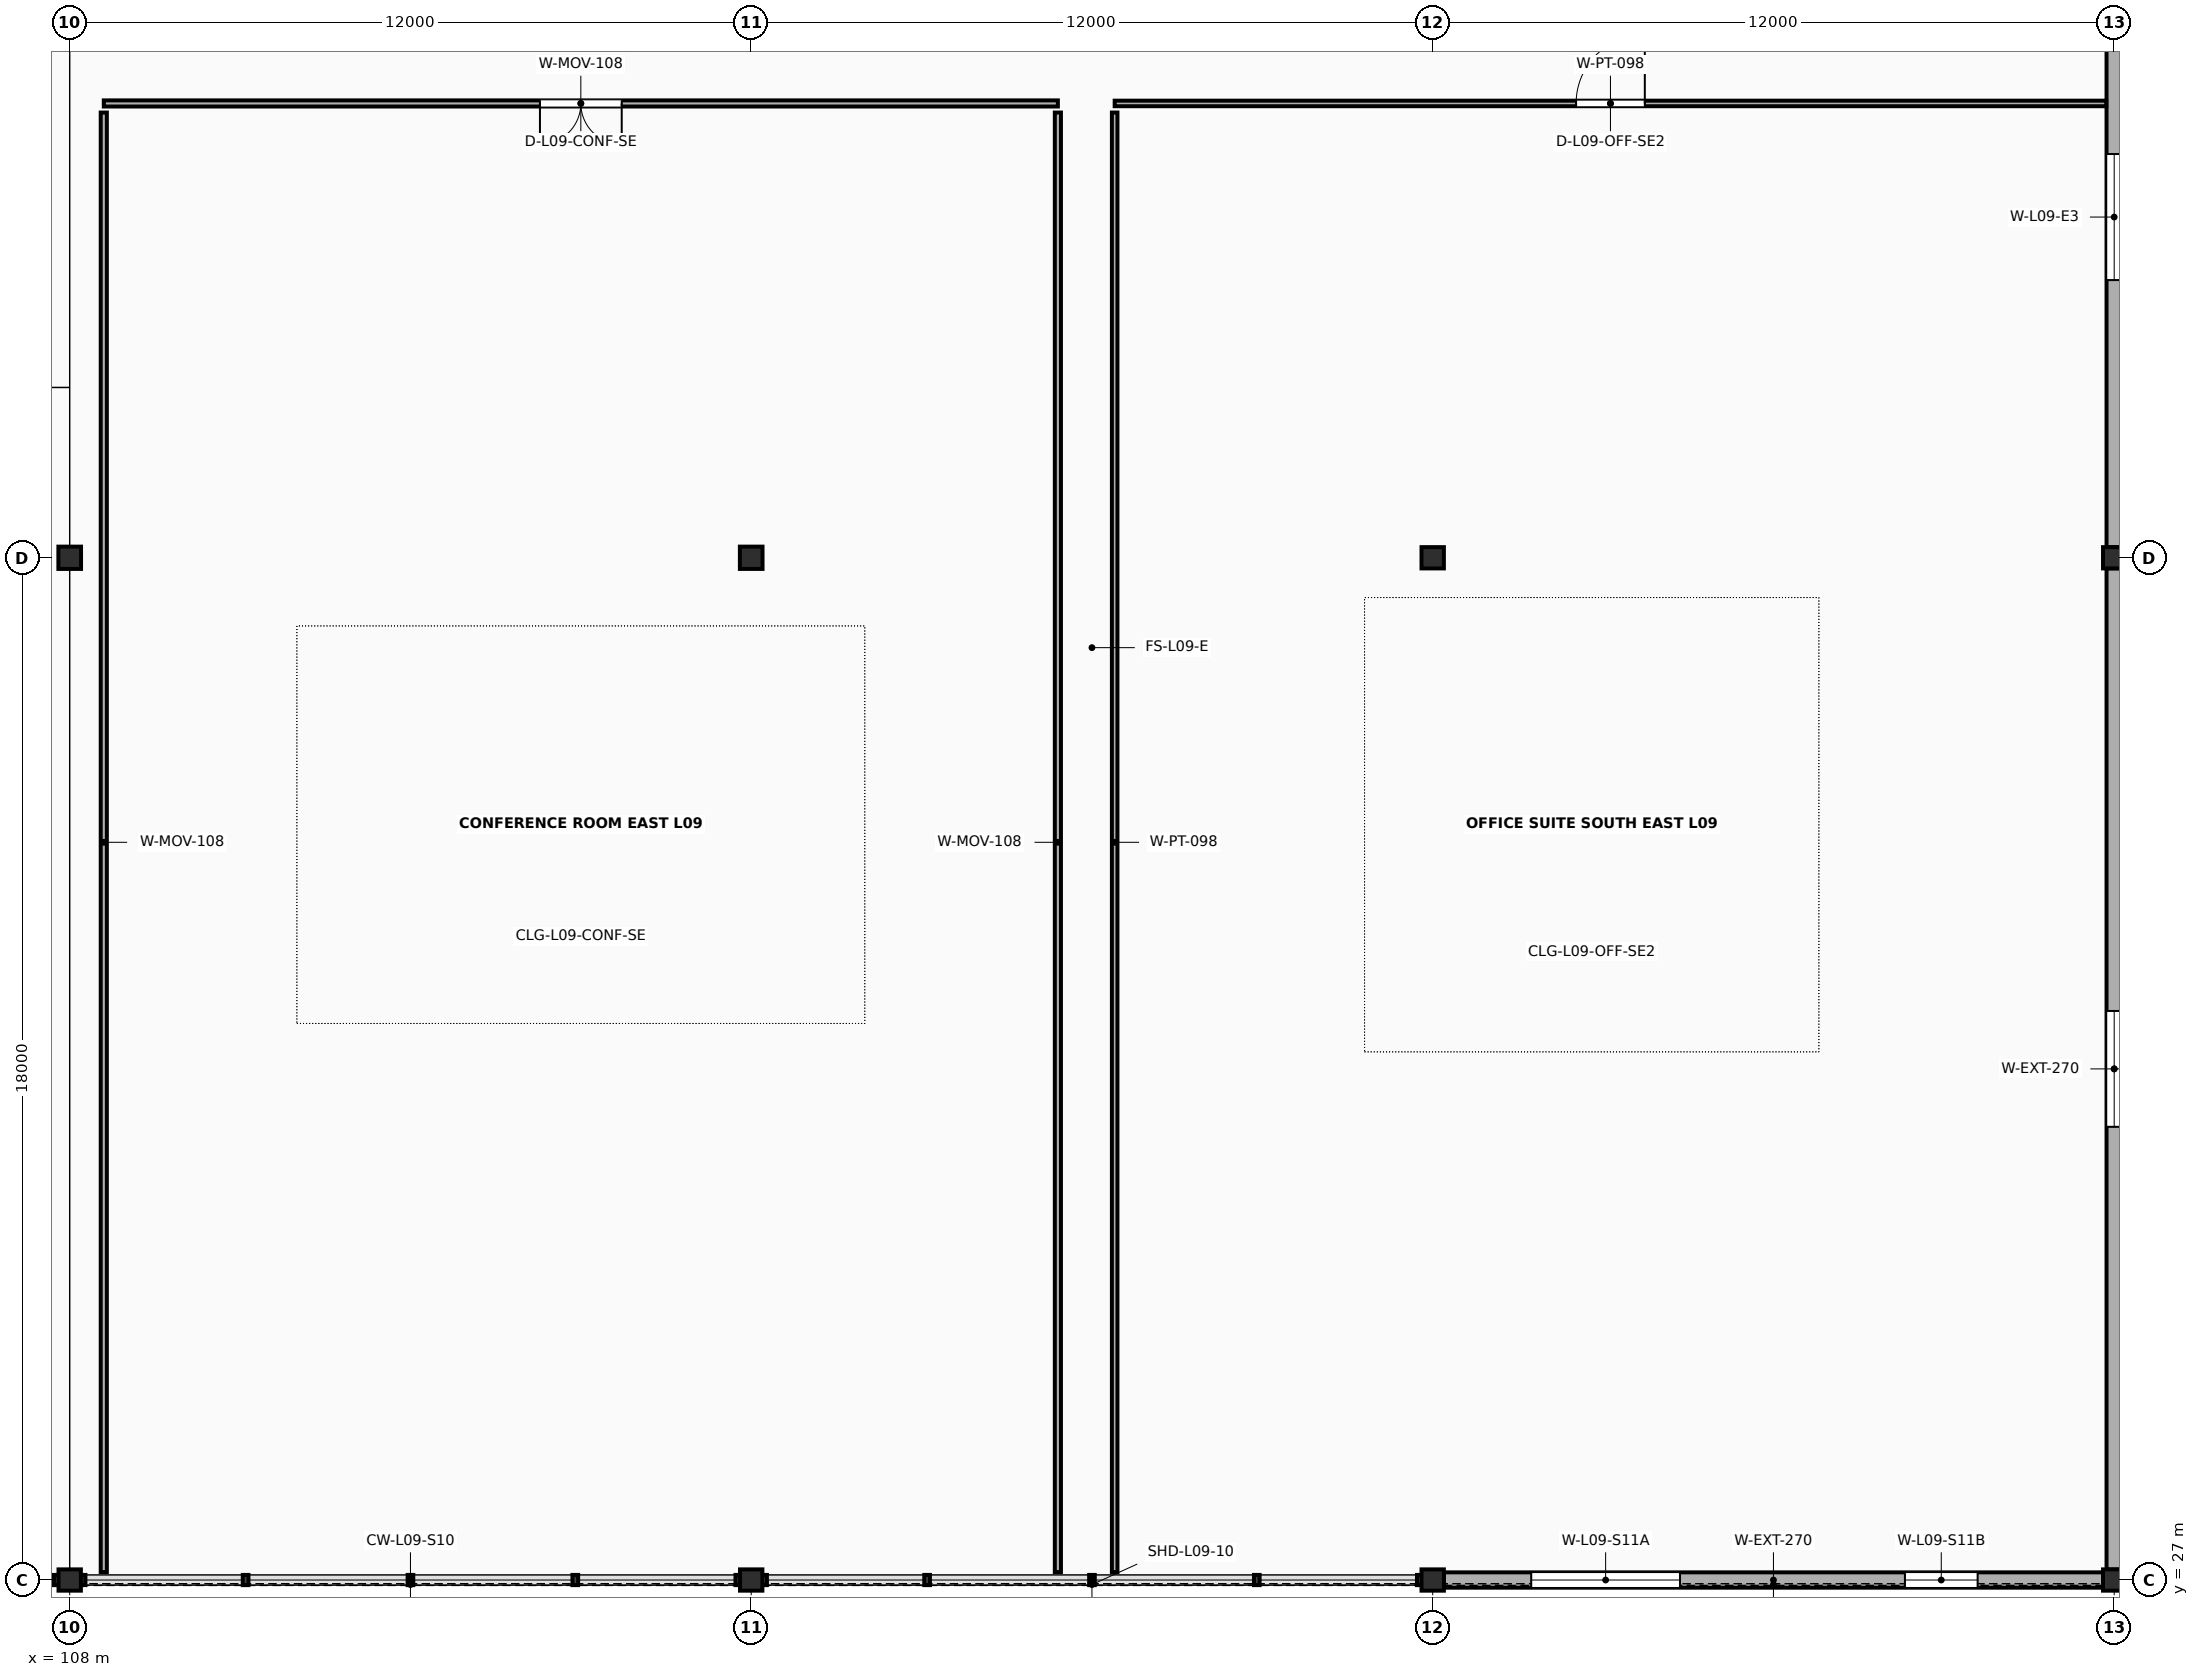
"""IFC4 building model, lengths in metres.
Left out: names, types, materials, properties, quantities, classifications, styles, units other than length and angle.
Written with IfcOpenShell. Run it as: python <this file> out.ifc"""

import sys

from ifc_helpers import new_model, si_unit, direction, frame, frame_2d, origin, origin_2d, place, context, subcontext, project, spatial, rectangle, i_section, extrude, element, fill, save


model = new_model("IFC4")
c1 = context("Model", 3, precision=1e-05, world=origin(), true_north=direction((0.0, 1.0)))
c2 = subcontext(c1, "Body", "Model", "MODEL_VIEW")
j1 = project(units=[si_unit("LENGTHUNIT", "METRE"), si_unit("PLANEANGLEUNIT", "RADIAN")], contexts=[c1])
p1 = place(None, origin())
s1 = spatial("IfcSite", under=j1, at=p1, CompositionType="ELEMENT")
p2 = place(p1, origin())
s2 = spatial("IfcBuilding", under=s1, at=p2, CompositionType="ELEMENT")
p3 = place(p2, frame((0.0, 0.0, 37.6)))
s3 = spatial("IfcBuildingStorey", under=s2, at=p3, CompositionType="ELEMENT", Elevation=37.6)
p4 = place(p3, frame((108.0, 27.0, 0.0), z_axis=(0.0, 0.0, 1.0), x_axis=(1.0, 0.0, 0.0)))
e1 = element("IfcColumn", 1, at=p4, inside=s3, PredefinedType="COLUMN", context=c2, shape_type="SweptSolid", body=[
    extrude(i_section(OverallWidth=0.394, OverallDepth=0.375, WebThickness=0.017, FlangeThickness=0.028, FilletRadius=0.018, at=origin_2d()), origin(), (0.0, 0.0, 1.0), 4.0),
])
p5 = place(p3, frame((108.0, 45.0, 0.0), z_axis=(0.0, 0.0, 1.0), x_axis=(1.0, 0.0, 0.0)))
e2 = element("IfcColumn", 2, at=p5, inside=s3, PredefinedType="COLUMN", context=c2, shape_type="SweptSolid", body=[
    extrude(i_section(OverallWidth=0.399, OverallDepth=0.393, WebThickness=0.023, FlangeThickness=0.037, FilletRadius=0.018, at=origin_2d()), origin(), (0.0, 0.0, 1.0), 4.0),
])
p6 = place(p3, frame((120.0, 27.0, 0.0), z_axis=(0.0, 0.0, 1.0), x_axis=(1.0, 0.0, 0.0)))
e3 = element("IfcColumn", 3, at=p6, inside=s3, PredefinedType="COLUMN", context=c2, shape_type="SweptSolid", body=[
    extrude(i_section(OverallWidth=0.394, OverallDepth=0.375, WebThickness=0.017, FlangeThickness=0.028, FilletRadius=0.018, at=origin_2d()), origin(), (0.0, 0.0, 1.0), 4.0),
])
p7 = place(p3, frame((120.0, 45.0, 0.0), z_axis=(0.0, 0.0, 1.0), x_axis=(1.0, 0.0, 0.0)))
e4 = element("IfcColumn", 4, at=p7, inside=s3, PredefinedType="COLUMN", context=c2, shape_type="SweptSolid", body=[
    extrude(i_section(OverallWidth=0.399, OverallDepth=0.393, WebThickness=0.023, FlangeThickness=0.037, FilletRadius=0.018, at=origin_2d()), origin(), (0.0, 0.0, 1.0), 4.0),
])
for number, where, z_axis, x_axis in (
    (5, (132.0, 27.0, 0.0), (0.0, 0.0, 1.0), (1.0, 0.0, 0.0)),
    (6, (132.0, 45.0, 0.0), (0.0, 0.0, 1.0), (1.0, 0.0, 0.0)),
    (7, (144.0, 27.0, 0.0), (0.0, 0.0, 1.0), (1.0, 0.0, 0.0)),
    (8, (144.0, 45.0, 0.0), (0.0, 0.0, 1.0), (1.0, 0.0, 0.0)),
):
    element("IfcColumn", number, at=place(p3, frame(where, z_axis=z_axis, x_axis=x_axis)), inside=s3, PredefinedType="COLUMN", context=c2, shape_type="SweptSolid", body=[
        extrude(i_section(OverallWidth=0.394, OverallDepth=0.375, WebThickness=0.017, FlangeThickness=0.028, FilletRadius=0.018, at=origin_2d()), origin(), (0.0, 0.0, 1.0), 4.0),
    ])
p8 = place(p3, frame((132.195, 27.0, 0.0), z_axis=(0.0, 0.0, 1.0), x_axis=(1.0, 0.0, 0.0)))
e9 = element("IfcWall", 9, at=p8, inside=s3, PredefinedType="SOLIDWALL", context=c2, shape_type="SweptSolid", body=[
    extrude(rectangle(XDim=11.61, YDim=0.27, at=frame_2d((5.805, 0.0))), origin(), (0.0, 0.0, 1.0), 3.291),
])
p9 = place(p8, frame((1.54, 0.0, 0.78)))
e10 = element("IfcOpeningElement", 10, at=p9, cuts=e9, PredefinedType="OPENING", context=c2, shape_type="SweptSolid", body=[
    extrude(rectangle(XDim=2.62, YDim=1.58, at=frame_2d((1.31, 0.79))), frame((0.0, 0.15, 0.0), z_axis=(0.0, -1.0, 0.0), x_axis=(1.0, 0.0, 0.0)), (0.0, 0.0, 1.0), 0.3),
])
p10 = place(p8, frame((8.12, 0.0, 0.78)))
e11 = element("IfcOpeningElement", 11, at=p10, cuts=e9, PredefinedType="OPENING", context=c2, shape_type="SweptSolid", body=[
    extrude(rectangle(XDim=1.28, YDim=1.74, at=frame_2d((0.64, 0.87))), frame((0.0, 0.15, 0.0), z_axis=(0.0, -1.0, 0.0), x_axis=(1.0, 0.0, 0.0)), (0.0, 0.0, 1.0), 0.3),
])
p11 = place(p3, frame((144.0, 27.186, 0.0), z_axis=(0.0, 0.0, 1.0), x_axis=(0.0, 1.0, 0.0)))
e12 = element("IfcWall", 12, at=p11, inside=s3, PredefinedType="SOLIDWALL", context=c2, shape_type="SweptSolid", body=[
    extrude(rectangle(XDim=17.629, YDim=0.27, at=frame_2d((8.814, 0.0))), origin(), (0.0, 0.0, 1.0), 3.291),
])
p12 = place(p11, frame((7.795, 0.0, 0.78)))
e13 = element("IfcOpeningElement", 13, at=p12, cuts=e12, PredefinedType="OPENING", context=c2, shape_type="SweptSolid", body=[
    extrude(rectangle(XDim=2.04, YDim=1.74, at=frame_2d((1.02, 0.87))), frame((0.0, 0.15, 0.0), z_axis=(0.0, -1.0, 0.0), x_axis=(1.0, 0.0, 0.0)), (0.0, 0.0, 1.0), 0.3),
])
p13 = place(p3, frame((144.0, 45.186, 0.0), z_axis=(0.0, 0.0, 1.0), x_axis=(0.0, 1.0, 0.0)))
e14 = element("IfcWall", 14, at=p13, inside=s3, PredefinedType="SOLIDWALL", context=c2, shape_type="SweptSolid", body=[
    extrude(rectangle(XDim=11.629, YDim=0.27, at=frame_2d((5.814, 0.0))), origin(), (0.0, 0.0, 1.0), 3.291),
])
p14 = place(p13, frame((4.704, 0.0, 0.78)))
e15 = element("IfcOpeningElement", 15, at=p14, cuts=e14, PredefinedType="OPENING", context=c2, shape_type="SweptSolid", body=[
    extrude(rectangle(XDim=2.22, YDim=1.74, at=frame_2d((1.11, 0.87))), frame((0.0, 0.15, 0.0), z_axis=(0.0, -1.0, 0.0), x_axis=(1.0, 0.0, 0.0)), (0.0, 0.0, 1.0), 0.3),
])
p15 = place(p3, frame((108.6, 53.0, 0.0), z_axis=(0.0, 0.0, 1.0), x_axis=(1.0, 0.0, 0.0)))
e16 = element("IfcWall", 16, at=p15, inside=s3, PredefinedType="MOVABLE", context=c2, shape_type="SweptSolid", body=[
    extrude(rectangle(XDim=16.8, YDim=0.108, at=frame_2d((8.4, 0.0))), origin(), (0.0, 0.0, 1.0), 2.88),
])
p16 = place(p15, frame((7.68, 0.0, 0.0)))
e17 = element("IfcOpeningElement", 17, at=p16, cuts=e16, PredefinedType="OPENING", context=c2, shape_type="SweptSolid", body=[
    extrude(rectangle(XDim=1.44, YDim=2.26, at=frame_2d((0.72, 1.13))), frame((0.0, 0.069, 0.0), z_axis=(0.0, -1.0, 0.0), x_axis=(1.0, 0.0, 0.0)), (0.0, 0.0, 1.0), 0.138),
])
for number, where, z_axis, x_axis in (
    (18, (108.6, 27.14, 0.0), (0.0, 0.0, 1.0), (0.0, 1.0, 0.0)),
    (19, (125.4, 27.14, 0.0), (0.0, 0.0, 1.0), (0.0, 1.0, 0.0)),
):
    element("IfcWall", number, at=place(p3, frame(where, z_axis=z_axis, x_axis=x_axis)), inside=s3, PredefinedType="MOVABLE", context=c2, shape_type="SweptSolid", body=[
        extrude(rectangle(XDim=25.7, YDim=0.108, at=frame_2d((12.85, 0.0))), origin(), (0.0, 0.0, 1.0), 2.88),
    ])
p17 = place(p3, frame((126.4, 53.0, 0.0), z_axis=(0.0, 0.0, 1.0), x_axis=(1.0, 0.0, 0.0)))
e20 = element("IfcWall", 20, at=p17, inside=s3, PredefinedType="PARTITIONING", context=c2, shape_type="SweptSolid", body=[
    extrude(rectangle(XDim=17.46, YDim=0.098, at=frame_2d((8.73, 0.0))), origin(), (0.0, 0.0, 1.0), 2.88),
])
p18 = place(p17, frame((8.125, 0.0, 0.0)))
e21 = element("IfcOpeningElement", 21, at=p18, cuts=e20, PredefinedType="OPENING", context=c2, shape_type="SweptSolid", body=[
    extrude(rectangle(XDim=1.21, YDim=2.25, at=frame_2d((0.605, 1.125))), frame((0.0, 0.064, 0.0), z_axis=(0.0, -1.0, 0.0), x_axis=(1.0, 0.0, 0.0)), (0.0, 0.0, 1.0), 0.128),
])
p19 = place(p3, frame((126.4, 27.14, 0.0), z_axis=(0.0, 0.0, 1.0), x_axis=(0.0, 1.0, 0.0)))
e22 = element("IfcWall", 22, at=p19, inside=s3, PredefinedType="PARTITIONING", context=c2, shape_type="SweptSolid", body=[
    extrude(rectangle(XDim=25.7, YDim=0.098, at=frame_2d((12.85, 0.0))), origin(), (0.0, 0.0, 1.0), 2.88),
])
p20 = place(p9, origin())
e23 = element("IfcWindow", 23, at=p20, inside=s3, PartitioningType="DOUBLE_PANEL_VERTICAL", PredefinedType="WINDOW", context=c2, shape_type="SweptSolid", body=[
    extrude(rectangle(XDim=2.62, YDim=1.58, at=frame_2d((1.31, 0.79))), frame((0.0, 0.03, 0.0), z_axis=(0.0, -1.0, 0.0), x_axis=(1.0, 0.0, 0.0)), (0.0, 0.0, 1.0), 0.06),
])
fill(e10, e23)
p21 = place(p10, origin())
e24 = element("IfcWindow", 24, at=p21, inside=s3, PartitioningType="SINGLE_PANEL", PredefinedType="WINDOW", context=c2, shape_type="SweptSolid", body=[
    extrude(rectangle(XDim=1.28, YDim=1.74, at=frame_2d((0.64, 0.87))), frame((0.0, 0.03, 0.0), z_axis=(0.0, -1.0, 0.0), x_axis=(1.0, 0.0, 0.0)), (0.0, 0.0, 1.0), 0.06),
])
fill(e11, e24)
p22 = place(p12, origin())
e25 = element("IfcWindow", 25, at=p22, inside=s3, PartitioningType="DOUBLE_PANEL_VERTICAL", PredefinedType="WINDOW", context=c2, shape_type="SweptSolid", body=[
    extrude(rectangle(XDim=2.04, YDim=1.74, at=frame_2d((1.02, 0.87))), frame((0.0, 0.03, 0.0), z_axis=(0.0, -1.0, 0.0), x_axis=(1.0, 0.0, 0.0)), (0.0, 0.0, 1.0), 0.06),
])
fill(e13, e25)
p23 = place(p14, origin())
e26 = element("IfcWindow", 26, at=p23, inside=s3, PartitioningType="DOUBLE_PANEL_VERTICAL", PredefinedType="WINDOW", context=c2, shape_type="SweptSolid", body=[
    extrude(rectangle(XDim=2.22, YDim=1.74, at=frame_2d((1.11, 0.87))), frame((0.0, 0.03, 0.0), z_axis=(0.0, -1.0, 0.0), x_axis=(1.0, 0.0, 0.0)), (0.0, 0.0, 1.0), 0.06),
])
fill(e15, e26)
p24 = place(p16, origin())
e27 = element("IfcDoor", 27, at=p24, inside=s3, OperationType="DOUBLE_DOOR_SINGLE_SWING", PredefinedType="DOOR", context=c2, shape_type="SweptSolid", body=[
    extrude(rectangle(XDim=1.44, YDim=2.26, at=frame_2d((0.72, 1.13))), frame((0.0, 0.025, 0.0), z_axis=(0.0, -1.0, 0.0), x_axis=(1.0, 0.0, 0.0)), (0.0, 0.0, 1.0), 0.05),
])
fill(e17, e27)
p25 = place(p18, origin())
e28 = element("IfcDoor", 28, at=p25, inside=s3, OperationType="SINGLE_SWING_RIGHT", PredefinedType="DOOR", context=c2, shape_type="SweptSolid", body=[
    extrude(rectangle(XDim=1.21, YDim=2.25, at=frame_2d((0.605, 1.125))), frame((0.0, 0.025, 0.0), z_axis=(0.0, -1.0, 0.0), x_axis=(1.0, 0.0, 0.0)), (0.0, 0.0, 1.0), 0.05),
])
fill(e21, e28)
save(model, sys.argv[1])
